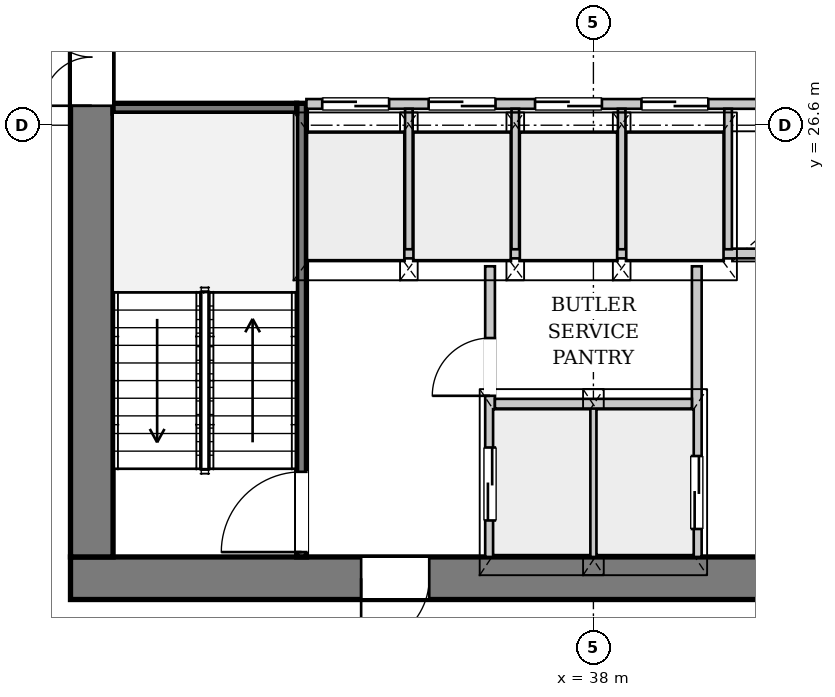
"""IFC4 building model, lengths in metres.
Left out: names, types, materials, properties, quantities, classifications, styles, units other than length and angle.
Written with IfcOpenShell. Run it as: python <this file> out.ifc"""

import sys

from ifc_helpers import new_model, si_unit, direction, frame, frame_2d, origin, place, context, subcontext, project, spatial, rectangle, extrude, source, transform, mapped, element, fill, save


model = new_model("IFC4")
c1 = context("Model", 3, precision=1e-05, world=origin(), true_north=direction((0.0, 1.0)))
c2 = subcontext(c1, "Body", "Model", "MODEL_VIEW")
j1 = project(units=[si_unit("LENGTHUNIT", "METRE"), si_unit("PLANEANGLEUNIT", "RADIAN")], contexts=[c1])
p1 = place(None, origin())
s1 = spatial("IfcSite", under=j1, at=p1, CompositionType="ELEMENT")
p2 = place(p1, origin())
s2 = spatial("IfcBuilding", under=s1, at=p2, CompositionType="ELEMENT")
p3 = place(p2, frame((0.0, 0.0, 123.45)))
s3 = spatial("IfcBuildingStorey", under=s2, at=p3, CompositionType="ELEMENT", Elevation=123.45)
p4 = place(p3, frame((46.6, 19.15, 0.0), z_axis=(0.0, 0.0, 1.0), x_axis=(-1.0, 0.0, 0.0)))
e1 = element("IfcWall", 1, at=p4, inside=s3, PredefinedType="SHEAR", context=c2, shape_type="SweptSolid", body=[
    extrude(rectangle(XDim=17.2, YDim=0.7, at=frame_2d((8.6, 0.0))), origin(), (0.0, 0.0, 1.0), 3.3),
])
p5 = place(p4, frame((4.8, 0.0, 0.0)))
e2 = element("IfcOpeningElement", 2, at=p5, cuts=e1, PredefinedType="OPENING", context=c2, shape_type="SweptSolid", body=[
    extrude(rectangle(XDim=1.12, YDim=2.25, at=frame_2d((0.56, 1.125))), frame((0.0, 0.36, 0.0), z_axis=(0.0, -1.0, 0.0), x_axis=(1.0, 0.0, 0.0)), (0.0, 0.0, 1.0), 0.72),
])
p6 = place(p4, frame((11.3, 0.0, 0.0)))
e3 = element("IfcOpeningElement", 3, at=p6, cuts=e1, PredefinedType="OPENING", context=c2, shape_type="SweptSolid", body=[
    extrude(rectangle(XDim=1.12, YDim=2.25, at=frame_2d((0.56, 1.125))), frame((0.0, 0.36, 0.0), z_axis=(0.0, -1.0, 0.0), x_axis=(1.0, 0.0, 0.0)), (0.0, 0.0, 1.0), 0.72),
])
p7 = place(p3, frame((29.75, 19.5, 0.0), z_axis=(0.0, 0.0, 1.0), x_axis=(0.0, 1.0, 0.0)))
e4 = element("IfcWall", 4, at=p7, inside=s3, PredefinedType="SHEAR", context=c2, shape_type="SweptSolid", body=[
    extrude(rectangle(XDim=14.2, YDim=0.7, at=frame_2d((7.1, 0.0))), origin(), (0.0, 0.0, 1.0), 3.3),
])
p8 = place(p7, frame((7.42, 0.0, 0.0)))
e5 = element("IfcOpeningElement", 5, at=p8, cuts=e4, PredefinedType="OPENING", context=c2, shape_type="SweptSolid", body=[
    extrude(rectangle(XDim=1.6, YDim=2.2, at=frame_2d((0.8, 1.1))), frame((0.0, 0.36, 0.0), z_axis=(0.0, -1.0, 0.0), x_axis=(1.0, 0.0, 0.0)), (0.0, 0.0, 1.0), 0.72),
])
p9 = place(p3, frame((33.2, 19.5, 0.0), z_axis=(0.0, 0.0, 1.0), x_axis=(0.0, 1.0, 0.0)))
e6 = element("IfcWall", 6, at=p9, inside=s3, PredefinedType="PARTITIONING", context=c2, shape_type="SweptSolid", body=[
    extrude(rectangle(XDim=7.46, YDim=0.16, at=frame_2d((3.73, 0.0))), origin(), (0.0, 0.0, 1.0), 3.3),
])
p10 = place(p9, frame((0.08, 0.0, 0.0)))
e7 = element("IfcOpeningElement", 7, at=p10, cuts=e6, PredefinedType="OPENING", context=c2, shape_type="SweptSolid", body=[
    extrude(rectangle(XDim=1.32, YDim=2.2, at=frame_2d((0.66, 1.1))), frame((0.0, 0.09, 0.0), z_axis=(0.0, -1.0, 0.0), x_axis=(1.0, 0.0, 0.0)), (0.0, 0.0, 1.0), 0.18),
])
p11 = place(p3, frame((30.1, 26.88, 0.0), z_axis=(0.0, 0.0, 1.0), x_axis=(1.0, 0.0, 0.0)))
e8 = element("IfcWall", 8, at=p11, inside=s3, PredefinedType="PARTITIONING", context=c2, shape_type="SweptSolid", body=[
    extrude(rectangle(XDim=3.02, YDim=0.16, at=frame_2d((1.51, 0.0))), origin(), (0.0, 0.0, 1.0), 3.3),
])
p12 = place(p3, frame((36.3, 19.5, 0.0), z_axis=(0.0, 0.0, 1.0), x_axis=(0.0, 1.0, 0.0)))
e9 = element("IfcWall", 9, at=p12, inside=s3, PredefinedType="PARTITIONING", context=c2, shape_type="SweptSolid", body=[
    extrude(rectangle(XDim=4.78, YDim=0.16, at=frame_2d((2.39, 0.0))), origin(), (0.0, 0.0, 1.0), 3.3),
])
p13 = place(p12, frame((0.6, 0.0, 0.0)))
e10 = element("IfcOpeningElement", 10, at=p13, cuts=e9, PredefinedType="OPENING", context=c2, shape_type="SweptSolid", body=[
    extrude(rectangle(XDim=1.2, YDim=2.2, at=frame_2d((0.6, 1.1))), frame((0.0, 0.09, 0.0), z_axis=(0.0, -1.0, 0.0), x_axis=(1.0, 0.0, 0.0)), (0.0, 0.0, 1.0), 0.18),
])
p14 = place(p12, frame((2.65, 0.0, 0.0)))
e11 = element("IfcOpeningElement", 11, at=p14, cuts=e9, PredefinedType="OPENING", context=c2, shape_type="SweptSolid", body=[
    extrude(rectangle(XDim=0.95, YDim=2.1, at=frame_2d((0.475, 1.05))), frame((0.0, 0.09, 0.0), z_axis=(0.0, -1.0, 0.0), x_axis=(1.0, 0.0, 0.0)), (0.0, 0.0, 1.0), 0.18),
])
p15 = place(p3, frame((39.7, 24.28, 0.0), z_axis=(0.0, 0.0, 1.0), x_axis=(0.0, -1.0, 0.0)))
e12 = element("IfcWall", 12, at=p15, inside=s3, PredefinedType="PARTITIONING", context=c2, shape_type="SweptSolid", body=[
    extrude(rectangle(XDim=4.78, YDim=0.16, at=frame_2d((2.39, 0.0))), origin(), (0.0, 0.0, 1.0), 3.3),
])
p16 = place(p15, frame((3.12, 0.0, 0.0)))
e13 = element("IfcOpeningElement", 13, at=p16, cuts=e12, PredefinedType="OPENING", context=c2, shape_type="SweptSolid", body=[
    extrude(rectangle(XDim=1.2, YDim=2.2, at=frame_2d((0.6, 1.1))), frame((0.0, 0.09, 0.0), z_axis=(0.0, -1.0, 0.0), x_axis=(1.0, 0.0, 0.0)), (0.0, 0.0, 1.0), 0.18),
])
p17 = place(p3, frame((38.0, 19.5, 0.0), z_axis=(0.0, 0.0, 1.0), x_axis=(0.0, 1.0, 0.0)))
e14 = element("IfcWall", 14, at=p17, inside=s3, PredefinedType="PARTITIONING", context=c2, shape_type="SweptSolid", body=[
    extrude(rectangle(XDim=2.46, YDim=0.125, at=frame_2d((1.23, 0.0))), origin(), (0.0, 0.0, 1.0), 3.3),
])
p18 = place(p3, frame((36.38, 22.02, 0.0), z_axis=(0.0, 0.0, 1.0), x_axis=(1.0, 0.0, 0.0)))
e15 = element("IfcWall", 15, at=p18, inside=s3, PredefinedType="PARTITIONING", context=c2, shape_type="SweptSolid", body=[
    extrude(rectangle(XDim=3.24, YDim=0.16, at=frame_2d((1.62, 0.0))), origin(), (0.0, 0.0, 1.0), 3.3),
])
p19 = place(p3, frame((33.28, 24.49, 0.0), z_axis=(0.0, 0.0, 1.0), x_axis=(1.0, 0.0, 0.0)))
e16 = element("IfcWall", 16, at=p19, inside=s3, PredefinedType="PARTITIONING", context=c2, shape_type="SweptSolid", body=[
    extrude(rectangle(XDim=9.44, YDim=0.16, at=frame_2d((4.72, 0.0))), origin(), (0.0, 0.0, 1.0), 3.3),
])
p20 = place(p3, frame((33.28, 26.95, 0.0), z_axis=(0.0, 0.0, 1.0), x_axis=(1.0, 0.0, 0.0)))
e17 = element("IfcWall", 17, at=p20, inside=s3, PredefinedType="PARTITIONING", context=c2, shape_type="SweptSolid", body=[
    extrude(rectangle(XDim=9.44, YDim=0.16, at=frame_2d((4.72, 0.0))), origin(), (0.0, 0.0, 1.0), 3.3),
])
p21 = place(p20, frame((0.26, 0.0, 0.0)))
e18 = element("IfcOpeningElement", 18, at=p21, cuts=e17, PredefinedType="OPENING", context=c2, shape_type="SweptSolid", body=[
    extrude(rectangle(XDim=1.1, YDim=2.2, at=frame_2d((0.55, 1.1))), frame((0.0, 0.09, 0.0), z_axis=(0.0, -1.0, 0.0), x_axis=(1.0, 0.0, 0.0)), (0.0, 0.0, 1.0), 0.18),
])
p22 = place(p20, frame((2.01, 0.0, 0.0)))
e19 = element("IfcOpeningElement", 19, at=p22, cuts=e17, PredefinedType="OPENING", context=c2, shape_type="SweptSolid", body=[
    extrude(rectangle(XDim=1.1, YDim=2.2, at=frame_2d((0.55, 1.1))), frame((0.0, 0.09, 0.0), z_axis=(0.0, -1.0, 0.0), x_axis=(1.0, 0.0, 0.0)), (0.0, 0.0, 1.0), 0.18),
])
p23 = place(p20, frame((3.76, 0.0, 0.0)))
e20 = element("IfcOpeningElement", 20, at=p23, cuts=e17, PredefinedType="OPENING", context=c2, shape_type="SweptSolid", body=[
    extrude(rectangle(XDim=1.1, YDim=2.2, at=frame_2d((0.55, 1.1))), frame((0.0, 0.09, 0.0), z_axis=(0.0, -1.0, 0.0), x_axis=(1.0, 0.0, 0.0)), (0.0, 0.0, 1.0), 0.18),
])
p24 = place(p20, frame((5.51, 0.0, 0.0)))
e21 = element("IfcOpeningElement", 21, at=p24, cuts=e17, PredefinedType="OPENING", context=c2, shape_type="SweptSolid", body=[
    extrude(rectangle(XDim=1.1, YDim=2.2, at=frame_2d((0.55, 1.1))), frame((0.0, 0.09, 0.0), z_axis=(0.0, -1.0, 0.0), x_axis=(1.0, 0.0, 0.0)), (0.0, 0.0, 1.0), 0.18),
])
for number, where, z_axis, x_axis in (
    (22, (34.965, 24.56, 0.0), (0.0, 0.0, 1.0), (0.0, 1.0, 0.0)),
    (23, (36.715, 24.56, 0.0), (0.0, 0.0, 1.0), (0.0, 1.0, 0.0)),
    (24, (38.465, 24.56, 0.0), (0.0, 0.0, 1.0), (0.0, 1.0, 0.0)),
    (25, (40.215, 24.56, 0.0), (0.0, 0.0, 1.0), (0.0, 1.0, 0.0)),
):
    element("IfcWall", number, at=place(p3, frame(where, z_axis=z_axis, x_axis=x_axis)), inside=s3, PredefinedType="PARTITIONING", context=c2, shape_type="SweptSolid", body=[
        extrude(rectangle(XDim=2.31, YDim=0.125, at=frame_2d((1.155, 0.0))), origin(), (0.0, 0.0, 1.0), 3.3),
    ])
m1 = source(origin(), c2, "Body", "SweptSolid", [
    extrude(rectangle(XDim=1.12, YDim=2.25, at=frame_2d((0.56, 1.125))), frame((0.0, 0.025, 0.0), z_axis=(0.0, -1.0, 0.0), x_axis=(1.0, 0.0, 0.0)), (0.0, 0.0, 1.0), 0.05),
])
p25 = place(p6, origin())
e26 = element("IfcDoor", 26, at=p25, inside=s3, OperationType="SINGLE_SWING_RIGHT", PredefinedType="DOOR", context=c2, shape_type="MappedRepresentation", body=[
    mapped(m1, transform((0.0, 0.0, 0.0), x_axis=(1.0, 0.0, 0.0), y_axis=(0.0, 1.0, 0.0), z_axis=(0.0, 0.0, 1.0), scale=1.0)),
])
fill(e3, e26)
m2 = source(origin(), c2, "Body", "SweptSolid", [
    extrude(rectangle(XDim=1.6, YDim=2.2, at=frame_2d((0.8, 1.1))), frame((0.0, 0.025, 0.0), z_axis=(0.0, -1.0, 0.0), x_axis=(1.0, 0.0, 0.0)), (0.0, 0.0, 1.0), 0.05),
])
p26 = place(p8, origin())
e27 = element("IfcDoor", 27, at=p26, inside=s3, OperationType="DOUBLE_DOOR_SINGLE_SWING", PredefinedType="DOOR", context=c2, shape_type="MappedRepresentation", body=[
    mapped(m2, transform((0.0, 0.0, 0.0), x_axis=(1.0, 0.0, 0.0), y_axis=(0.0, 1.0, 0.0), z_axis=(0.0, 0.0, 1.0), scale=1.0)),
])
fill(e5, e27)
m3 = source(origin(), c2, "Body", "SweptSolid", [
    extrude(rectangle(XDim=1.32, YDim=2.2, at=frame_2d((0.66, 1.1))), frame((0.0, 0.025, 0.0), z_axis=(0.0, -1.0, 0.0), x_axis=(1.0, 0.0, 0.0)), (0.0, 0.0, 1.0), 0.05),
])
p27 = place(p10, origin())
e28 = element("IfcDoor", 28, at=p27, inside=s3, OperationType="SINGLE_SWING_LEFT", PredefinedType="DOOR", context=c2, shape_type="MappedRepresentation", body=[
    mapped(m3, transform((0.0, 0.0, 0.0), x_axis=(1.0, 0.0, 0.0), y_axis=(0.0, 1.0, 0.0), z_axis=(0.0, 0.0, 1.0), scale=1.0)),
])
fill(e7, e28)
m4 = source(origin(), c2, "Body", "SweptSolid", [
    extrude(rectangle(XDim=1.2, YDim=2.2, at=frame_2d((0.6, 1.1))), frame((0.0, 0.025, 0.0), z_axis=(0.0, -1.0, 0.0), x_axis=(1.0, 0.0, 0.0)), (0.0, 0.0, 1.0), 0.05),
])
p28 = place(p13, origin())
e29 = element("IfcDoor", 29, at=p28, inside=s3, OperationType="DOUBLE_DOOR_SLIDING", PredefinedType="DOOR", context=c2, shape_type="MappedRepresentation", body=[
    mapped(m4, transform((0.0, 0.0, 0.0), x_axis=(1.0, 0.0, 0.0), y_axis=(0.0, 1.0, 0.0), z_axis=(0.0, 0.0, 1.0), scale=1.0)),
])
fill(e10, e29)
m5 = source(origin(), c2, "Body", "SweptSolid", [
    extrude(rectangle(XDim=0.95, YDim=2.1, at=frame_2d((0.475, 1.05))), frame((0.0, 0.025, 0.0), z_axis=(0.0, -1.0, 0.0), x_axis=(1.0, 0.0, 0.0)), (0.0, 0.0, 1.0), 0.05),
])
p29 = place(p14, origin())
e30 = element("IfcDoor", 30, at=p29, inside=s3, OperationType="SINGLE_SWING_LEFT", PredefinedType="DOOR", context=c2, shape_type="MappedRepresentation", body=[
    mapped(m5, transform((0.0, 0.0, 0.0), x_axis=(1.0, 0.0, 0.0), y_axis=(0.0, 1.0, 0.0), z_axis=(0.0, 0.0, 1.0), scale=1.0)),
])
fill(e11, e30)
p30 = place(p16, origin())
e31 = element("IfcDoor", 31, at=p30, inside=s3, OperationType="DOUBLE_DOOR_SLIDING", PredefinedType="DOOR", context=c2, shape_type="MappedRepresentation", body=[
    mapped(m4, transform((0.0, 0.0, 0.0), x_axis=(1.0, 0.0, 0.0), y_axis=(0.0, 1.0, 0.0), z_axis=(0.0, 0.0, 1.0), scale=1.0)),
])
fill(e13, e31)
m6 = source(origin(), c2, "Body", "SweptSolid", [
    extrude(rectangle(XDim=1.1, YDim=2.2, at=frame_2d((0.55, 1.1))), frame((0.0, 0.025, 0.0), z_axis=(0.0, -1.0, 0.0), x_axis=(1.0, 0.0, 0.0)), (0.0, 0.0, 1.0), 0.05),
])
p31 = place(p21, origin())
e32 = element("IfcDoor", 32, at=p31, inside=s3, OperationType="DOUBLE_DOOR_SLIDING", PredefinedType="DOOR", context=c2, shape_type="MappedRepresentation", body=[
    mapped(m6, transform((0.0, 0.0, 0.0), x_axis=(1.0, 0.0, 0.0), y_axis=(0.0, 1.0, 0.0), z_axis=(0.0, 0.0, 1.0), scale=1.0)),
])
fill(e18, e32)
p32 = place(p22, origin())
e33 = element("IfcDoor", 33, at=p32, inside=s3, OperationType="DOUBLE_DOOR_SLIDING", PredefinedType="DOOR", context=c2, shape_type="MappedRepresentation", body=[
    mapped(m6, transform((0.0, 0.0, 0.0), x_axis=(1.0, 0.0, 0.0), y_axis=(0.0, 1.0, 0.0), z_axis=(0.0, 0.0, 1.0), scale=1.0)),
])
fill(e19, e33)
p33 = place(p23, origin())
e34 = element("IfcDoor", 34, at=p33, inside=s3, OperationType="DOUBLE_DOOR_SLIDING", PredefinedType="DOOR", context=c2, shape_type="MappedRepresentation", body=[
    mapped(m6, transform((0.0, 0.0, 0.0), x_axis=(1.0, 0.0, 0.0), y_axis=(0.0, 1.0, 0.0), z_axis=(0.0, 0.0, 1.0), scale=1.0)),
])
fill(e20, e34)
p34 = place(p24, origin())
e35 = element("IfcDoor", 35, at=p34, inside=s3, OperationType="DOUBLE_DOOR_SLIDING", PredefinedType="DOOR", context=c2, shape_type="MappedRepresentation", body=[
    mapped(m6, transform((0.0, 0.0, 0.0), x_axis=(1.0, 0.0, 0.0), y_axis=(0.0, 1.0, 0.0), z_axis=(0.0, 0.0, 1.0), scale=1.0)),
])
fill(e21, e35)
save(model, sys.argv[1])
